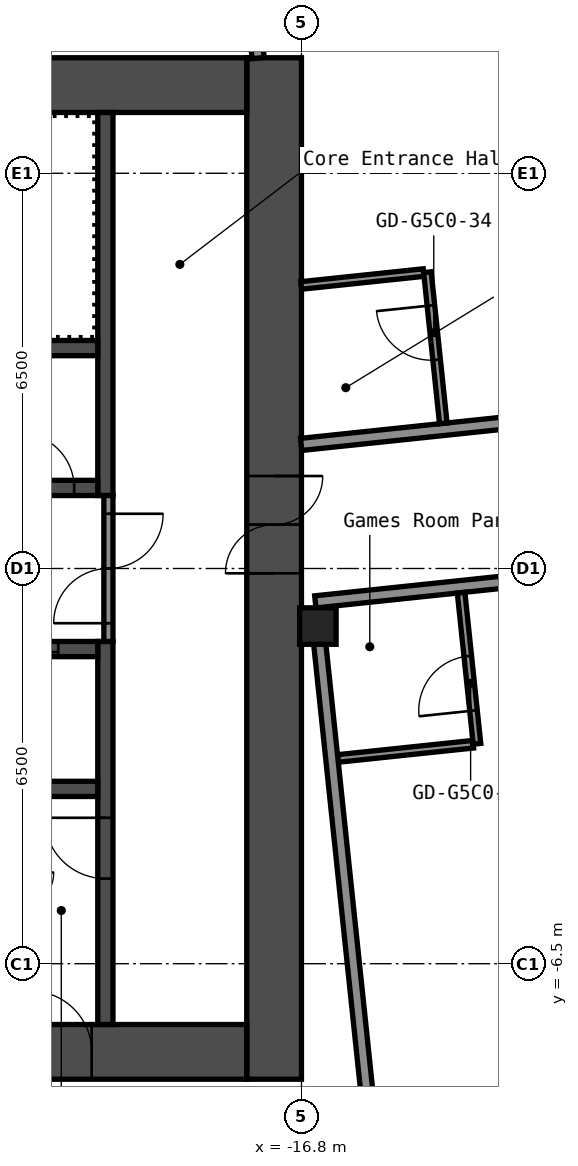
"""IFC4 building model, lengths in metres.
Left out: names, types, materials, properties, quantities, classifications, styles, units other than length and angle.
Written with IfcOpenShell. Run it as: python <this file> out.ifc"""

import sys

from ifc_helpers import new_model, si_unit, direction, frame, frame_2d, origin, origin_2d, place, context, subcontext, project, spatial, rectangle, hollow_rectangle, extrude, element, fill, save


model = new_model("IFC4")
c1 = context("Model", 3, precision=1e-05, world=origin(), true_north=direction((0.0, 1.0)))
c2 = subcontext(c1, "Body", "Model", "MODEL_VIEW")
j1 = project(units=[si_unit("LENGTHUNIT", "METRE"), si_unit("PLANEANGLEUNIT", "RADIAN")], contexts=[c1])
p1 = place(None, origin())
s1 = spatial("IfcSite", under=j1, at=p1, CompositionType="ELEMENT")
p2 = place(p1, origin())
s2 = spatial("IfcBuilding", under=s1, at=p2, CompositionType="ELEMENT")
p3 = place(p2, frame((0.0, 0.0, 245.4)))
s3 = spatial("IfcBuildingStorey", under=s2, at=p3, CompositionType="ELEMENT", Elevation=245.4)
p4 = place(p3, frame((-16.53, -0.947, 0.0), z_axis=(0.0, 0.0, 1.0), x_axis=(1.0, 0.0, 0.0)))
e1 = element("IfcColumn", 1, at=p4, inside=s3, PredefinedType="COLUMN", context=c2, shape_type="SweptSolid", body=[
    extrude(hollow_rectangle(XDim=0.6, YDim=0.6, WallThickness=0.025, InnerFilletRadius=0.038, OuterFilletRadius=0.062, at=origin_2d()), origin(), (0.0, 0.0, 1.0), 2.75),
])
p5 = place(p3, frame((-17.25, -8.4, 0.0), z_axis=(0.0, 0.0, 1.0), x_axis=(0.0, 1.0, 0.0)))
e2 = element("IfcWall", 2, at=p5, inside=s3, PredefinedType="SHEAR", context=c2, shape_type="SweptSolid", body=[
    extrude(rectangle(XDim=16.8, YDim=0.9, at=frame_2d((8.4, 0.0))), origin(), (0.0, 0.0, 1.0), 2.75),
])
p6 = place(p5, frame((8.321, 0.0, 0.0)))
e3 = element("IfcOpeningElement", 3, at=p6, cuts=e2, PredefinedType="OPENING", context=c2, shape_type="SweptSolid", body=[
    extrude(rectangle(XDim=1.6, YDim=2.1, at=frame_2d((0.8, 1.05))), frame((0.0, 0.46, 0.0), z_axis=(0.0, -1.0, 0.0), x_axis=(1.0, 0.0, 0.0)), (0.0, 0.0, 1.0), 0.92),
])
p7 = place(p3, frame((-32.7, 7.95, 0.0), z_axis=(0.0, 0.0, 1.0), x_axis=(1.0, 0.0, 0.0)))
e4 = element("IfcWall", 4, at=p7, inside=s3, PredefinedType="SHEAR", context=c2, shape_type="SweptSolid", body=[
    extrude(rectangle(XDim=15.0, YDim=0.9, at=frame_2d((7.5, 0.0))), origin(), (0.0, 0.0, 1.0), 2.75),
])
p8 = place(p7, frame((3.4, 0.0, 0.0)))
e5 = element("IfcOpeningElement", 5, at=p8, cuts=e4, PredefinedType="OPENING", context=c2, shape_type="SweptSolid", body=[
    extrude(rectangle(XDim=1.2, YDim=2.1, at=frame_2d((0.6, 1.05))), frame((0.0, 0.46, 0.0), z_axis=(0.0, -1.0, 0.0), x_axis=(1.0, 0.0, 0.0)), (0.0, 0.0, 1.0), 0.92),
])
p9 = place(p7, frame((0.75, 0.0, 0.0)))
e6 = element("IfcOpeningElement", 6, at=p9, cuts=e4, PredefinedType="OPENING", context=c2, shape_type="SweptSolid", body=[
    extrude(rectangle(XDim=0.9, YDim=2.1, at=frame_2d((0.45, 1.05))), frame((0.0, 0.46, 0.0), z_axis=(0.0, -1.0, 0.0), x_axis=(1.0, 0.0, 0.0)), (0.0, 0.0, 1.0), 0.92),
])
p10 = place(p3, frame((-32.7, -7.95, 0.0), z_axis=(0.0, 0.0, 1.0), x_axis=(1.0, 0.0, 0.0)))
e7 = element("IfcWall", 7, at=p10, inside=s3, PredefinedType="SHEAR", context=c2, shape_type="SweptSolid", body=[
    extrude(rectangle(XDim=15.0, YDim=0.9, at=frame_2d((7.5, 0.0))), origin(), (0.0, 0.0, 1.0), 2.75),
])
p11 = place(p10, frame((11.45, 0.0, 0.0)))
e8 = element("IfcOpeningElement", 8, at=p11, cuts=e7, PredefinedType="OPENING", context=c2, shape_type="SweptSolid", body=[
    extrude(rectangle(XDim=1.0, YDim=2.1, at=frame_2d((0.5, 1.05))), frame((0.0, 0.46, 0.0), z_axis=(0.0, -1.0, 0.0), x_axis=(1.0, 0.0, 0.0)), (0.0, 0.0, 1.0), 0.92),
])
p12 = place(p3, frame((-20.025, 1.2, 0.0), z_axis=(0.0, 0.0, 1.0), x_axis=(0.0, 1.0, 0.0)))
e9 = element("IfcWall", 9, at=p12, inside=s3, PredefinedType="SHEAR", context=c2, shape_type="SweptSolid", body=[
    extrude(rectangle(XDim=6.3, YDim=0.25, at=frame_2d((3.15, 0.0))), origin(), (0.0, 0.0, 1.0), 2.75),
])
p13 = place(p3, frame((-20.025, -7.5, 0.0), z_axis=(0.0, 0.0, 1.0), x_axis=(0.0, 1.0, 0.0)))
e10 = element("IfcWall", 10, at=p13, inside=s3, PredefinedType="SHEAR", context=c2, shape_type="SweptSolid", body=[
    extrude(rectangle(XDim=6.3, YDim=0.25, at=frame_2d((3.15, 0.0))), origin(), (0.0, 0.0, 1.0), 2.75),
])
p14 = place(p13, frame((2.4, 0.0, 0.0)))
e11 = element("IfcOpeningElement", 11, at=p14, cuts=e10, PredefinedType="OPENING", context=c2, shape_type="SweptSolid", body=[
    extrude(rectangle(XDim=1.0, YDim=2.1, at=frame_2d((0.5, 1.05))), frame((0.0, 0.135, 0.0), z_axis=(0.0, -1.0, 0.0), x_axis=(1.0, 0.0, 0.0)), (0.0, 0.0, 1.0), 0.27),
])
p15 = place(p3, frame((-27.65, 1.325, 0.0), z_axis=(0.0, 0.0, 1.0), x_axis=(1.0, 0.0, 0.0)))
e12 = element("IfcWall", 12, at=p15, inside=s3, PredefinedType="SHEAR", context=c2, shape_type="SweptSolid", body=[
    extrude(rectangle(XDim=7.5, YDim=0.25, at=frame_2d((3.75, 0.0))), origin(), (0.0, 0.0, 1.0), 2.75),
])
p16 = place(p15, frame((6.212, 0.0, 0.0)))
e13 = element("IfcOpeningElement", 13, at=p16, cuts=e12, PredefinedType="OPENING", context=c2, shape_type="SweptSolid", body=[
    extrude(rectangle(XDim=0.9, YDim=2.1, at=frame_2d((0.45, 1.05))), frame((0.0, 0.135, 0.0), z_axis=(0.0, -1.0, 0.0), x_axis=(1.0, 0.0, 0.0)), (0.0, 0.0, 1.0), 0.27),
])
p17 = place(p15, frame((2.512, 0.0, 0.0)))
e14 = element("IfcOpeningElement", 14, at=p17, cuts=e12, PredefinedType="OPENING", context=c2, shape_type="SweptSolid", body=[
    extrude(rectangle(XDim=0.9, YDim=2.1, at=frame_2d((0.45, 1.05))), frame((0.0, 0.135, 0.0), z_axis=(0.0, -1.0, 0.0), x_axis=(1.0, 0.0, 0.0)), (0.0, 0.0, 1.0), 0.27),
])
p18 = place(p3, frame((-27.65, 3.625, 0.0), z_axis=(0.0, 0.0, 1.0), x_axis=(1.0, 0.0, 0.0)))
e15 = element("IfcWall", 15, at=p18, inside=s3, PredefinedType="SHEAR", context=c2, shape_type="SweptSolid", body=[
    extrude(rectangle(XDim=7.5, YDim=0.25, at=frame_2d((3.75, 0.0))), origin(), (0.0, 0.0, 1.0), 2.75),
])
p19 = place(p3, frame((-27.65, -1.325, 0.0), z_axis=(0.0, 0.0, 1.0), x_axis=(1.0, 0.0, 0.0)))
e16 = element("IfcWall", 16, at=p19, inside=s3, PredefinedType="SHEAR", context=c2, shape_type="SweptSolid", body=[
    extrude(rectangle(XDim=7.5, YDim=0.25, at=frame_2d((3.75, 0.0))), origin(), (0.0, 0.0, 1.0), 2.75),
])
p20 = place(p19, frame((5.75, 0.0, 0.0)))
e17 = element("IfcOpeningElement", 17, at=p20, cuts=e16, PredefinedType="OPENING", context=c2, shape_type="SweptSolid", body=[
    extrude(rectangle(XDim=1.1, YDim=2.1, at=frame_2d((0.55, 1.05))), frame((0.0, 0.135, 0.0), z_axis=(0.0, -1.0, 0.0), x_axis=(1.0, 0.0, 0.0)), (0.0, 0.0, 1.0), 0.27),
])
p21 = place(p19, frame((3.35, 0.0, 0.0)))
e18 = element("IfcOpeningElement", 18, at=p21, cuts=e16, PredefinedType="OPENING", context=c2, shape_type="SweptSolid", body=[
    extrude(rectangle(XDim=1.1, YDim=2.1, at=frame_2d((0.55, 1.05))), frame((0.0, 0.135, 0.0), z_axis=(0.0, -1.0, 0.0), x_axis=(1.0, 0.0, 0.0)), (0.0, 0.0, 1.0), 0.27),
])
p22 = place(p19, frame((0.95, 0.0, 0.0)))
e19 = element("IfcOpeningElement", 19, at=p22, cuts=e16, PredefinedType="OPENING", context=c2, shape_type="SweptSolid", body=[
    extrude(rectangle(XDim=1.1, YDim=2.1, at=frame_2d((0.55, 1.05))), frame((0.0, 0.135, 0.0), z_axis=(0.0, -1.0, 0.0), x_axis=(1.0, 0.0, 0.0)), (0.0, 0.0, 1.0), 0.27),
])
p23 = place(p3, frame((-27.65, -3.625, 0.0), z_axis=(0.0, 0.0, 1.0), x_axis=(1.0, 0.0, 0.0)))
e20 = element("IfcWall", 20, at=p23, inside=s3, PredefinedType="SHEAR", context=c2, shape_type="SweptSolid", body=[
    extrude(rectangle(XDim=7.5, YDim=0.25, at=frame_2d((3.75, 0.0))), origin(), (0.0, 0.0, 1.0), 2.75),
])
p24 = place(p3, frame((-19.975, -1.2, 0.0), z_axis=(0.0, 0.0, 1.0), x_axis=(0.0, 1.0, 0.0)))
e21 = element("IfcWall", 21, at=p24, inside=s3, PredefinedType="PARTITIONING", context=c2, shape_type="SweptSolid", body=[
    extrude(rectangle(XDim=2.4, YDim=0.15, at=frame_2d((1.2, 0.0))), origin(), (0.0, 0.0, 1.0), 2.75),
])
p25 = place(p24, frame((0.3, 0.0, 0.0)))
e22 = element("IfcOpeningElement", 22, at=p25, cuts=e21, PredefinedType="OPENING", context=c2, shape_type="SweptSolid", body=[
    extrude(rectangle(XDim=1.8, YDim=2.1, at=frame_2d((0.9, 1.05))), frame((0.0, 0.085, 0.0), z_axis=(0.0, -1.0, 0.0), x_axis=(1.0, 0.0, 0.0)), (0.0, 0.0, 1.0), 0.17),
])
p26 = place(p3, frame((-16.201, -3.124, 0.0), z_axis=(0.0, 0.0, 1.0), x_axis=(0.99452218011, 0.104525754092, 0.0)))
e23 = element("IfcWall", 23, at=p26, inside=s3, PredefinedType="PARTITIONING", context=c2, shape_type="SweptSolid", body=[
    extrude(rectangle(XDim=2.238, YDim=0.125, at=frame_2d((1.119, 0.0))), origin(), (0.0, 0.0, 1.0), 2.75),
])
p27 = place(p3, frame((-16.572, -0.549, 0.0), z_axis=(0.0, 0.0, 1.0), x_axis=(0.994521146831, 0.104535584879, 0.0)))
e24 = element("IfcWall", 24, at=p27, inside=s3, PredefinedType="PARTITIONING", context=c2, shape_type="SweptSolid", body=[
    extrude(rectangle(XDim=33.561, YDim=0.2, at=frame_2d((16.78, 0.0))), origin(), (0.0, 0.0, 1.0), 2.75),
])
p28 = place(p27, frame((4.2, 0.0, 0.0)))
e25 = element("IfcOpeningElement", 25, at=p28, cuts=e24, PredefinedType="OPENING", context=c2, shape_type="SweptSolid", body=[
    extrude(rectangle(XDim=1.6, YDim=2.1, at=frame_2d((0.8, 1.05))), frame((0.0, 0.11, 0.0), z_axis=(0.0, -1.0, 0.0), x_axis=(1.0, 0.0, 0.0)), (0.0, 0.0, 1.0), 0.22),
])
p29 = place(p27, frame((11.25, 0.0, 0.0)))
e26 = element("IfcOpeningElement", 26, at=p29, cuts=e24, PredefinedType="OPENING", context=c2, shape_type="SweptSolid", body=[
    extrude(rectangle(XDim=1.0, YDim=2.1, at=frame_2d((0.5, 1.05))), frame((0.0, 0.11, 0.0), z_axis=(0.0, -1.0, 0.0), x_axis=(1.0, 0.0, 0.0)), (0.0, 0.0, 1.0), 0.22),
])
p30 = place(p27, frame((12.95, 0.0, 0.0)))
e27 = element("IfcOpeningElement", 27, at=p30, cuts=e24, PredefinedType="OPENING", context=c2, shape_type="SweptSolid", body=[
    extrude(rectangle(XDim=1.0, YDim=2.1, at=frame_2d((0.5, 1.05))), frame((0.0, 0.11, 0.0), z_axis=(0.0, -1.0, 0.0), x_axis=(1.0, 0.0, 0.0)), (0.0, 0.0, 1.0), 0.22),
])
p31 = place(p27, frame((18.2, 0.0, 0.0)))
e28 = element("IfcOpeningElement", 28, at=p31, cuts=e24, PredefinedType="OPENING", context=c2, shape_type="SweptSolid", body=[
    extrude(rectangle(XDim=0.9, YDim=2.1, at=frame_2d((0.45, 1.05))), frame((0.0, 0.11, 0.0), z_axis=(0.0, -1.0, 0.0), x_axis=(1.0, 0.0, 0.0)), (0.0, 0.0, 1.0), 0.22),
])
p32 = place(p27, frame((22.4, 0.0, 0.0)))
e29 = element("IfcOpeningElement", 29, at=p32, cuts=e24, PredefinedType="OPENING", context=c2, shape_type="SweptSolid", body=[
    extrude(rectangle(XDim=0.9, YDim=2.1, at=frame_2d((0.45, 1.05))), frame((0.0, 0.11, 0.0), z_axis=(0.0, -1.0, 0.0), x_axis=(1.0, 0.0, 0.0)), (0.0, 0.0, 1.0), 0.22),
])
p33 = place(p27, frame((26.345, 0.0, 0.0)))
e30 = element("IfcOpeningElement", 30, at=p33, cuts=e24, PredefinedType="OPENING", context=c2, shape_type="SweptSolid", body=[
    extrude(rectangle(XDim=0.9, YDim=2.1, at=frame_2d((0.45, 1.05))), frame((0.0, 0.11, 0.0), z_axis=(0.0, -1.0, 0.0), x_axis=(1.0, 0.0, 0.0)), (0.0, 0.0, 1.0), 0.22),
])
p34 = place(p27, frame((30.545, 0.0, 0.0)))
e31 = element("IfcOpeningElement", 31, at=p34, cuts=e24, PredefinedType="OPENING", context=c2, shape_type="SweptSolid", body=[
    extrude(rectangle(XDim=0.9, YDim=2.1, at=frame_2d((0.45, 1.05))), frame((0.0, 0.11, 0.0), z_axis=(0.0, -1.0, 0.0), x_axis=(1.0, 0.0, 0.0)), (0.0, 0.0, 1.0), 0.22),
])
p35 = place(p3, frame((-16.805, 2.041, 0.0), z_axis=(0.0, 0.0, 1.0), x_axis=(0.994521146831, 0.104535584879, 0.0)))
e32 = element("IfcWall", 32, at=p35, inside=s3, PredefinedType="PARTITIONING", context=c2, shape_type="SweptSolid", body=[
    extrude(rectangle(XDim=33.561, YDim=0.2, at=frame_2d((16.78, 0.0))), origin(), (0.0, 0.0, 1.0), 2.75),
])
p36 = place(p35, frame((4.161, 0.0, 0.0)))
e33 = element("IfcOpeningElement", 33, at=p36, cuts=e32, PredefinedType="OPENING", context=c2, shape_type="SweptSolid", body=[
    extrude(rectangle(XDim=1.6, YDim=2.1, at=frame_2d((0.8, 1.05))), frame((0.0, 0.11, 0.0), z_axis=(0.0, -1.0, 0.0), x_axis=(1.0, 0.0, 0.0)), (0.0, 0.0, 1.0), 0.22),
])
p37 = place(p35, frame((11.211, 0.0, 0.0)))
e34 = element("IfcOpeningElement", 34, at=p37, cuts=e32, PredefinedType="OPENING", context=c2, shape_type="SweptSolid", body=[
    extrude(rectangle(XDim=1.0, YDim=2.1, at=frame_2d((0.5, 1.05))), frame((0.0, 0.11, 0.0), z_axis=(0.0, -1.0, 0.0), x_axis=(1.0, 0.0, 0.0)), (0.0, 0.0, 1.0), 0.22),
])
p38 = place(p35, frame((12.911, 0.0, 0.0)))
e35 = element("IfcOpeningElement", 35, at=p38, cuts=e32, PredefinedType="OPENING", context=c2, shape_type="SweptSolid", body=[
    extrude(rectangle(XDim=1.0, YDim=2.1, at=frame_2d((0.5, 1.05))), frame((0.0, 0.11, 0.0), z_axis=(0.0, -1.0, 0.0), x_axis=(1.0, 0.0, 0.0)), (0.0, 0.0, 1.0), 0.22),
])
p39 = place(p35, frame((18.241, 0.0, 0.0)))
e36 = element("IfcOpeningElement", 36, at=p39, cuts=e32, PredefinedType="OPENING", context=c2, shape_type="SweptSolid", body=[
    extrude(rectangle(XDim=0.9, YDim=2.1, at=frame_2d((0.45, 1.05))), frame((0.0, 0.11, 0.0), z_axis=(0.0, -1.0, 0.0), x_axis=(1.0, 0.0, 0.0)), (0.0, 0.0, 1.0), 0.22),
])
p40 = place(p35, frame((22.441, 0.0, 0.0)))
e37 = element("IfcOpeningElement", 37, at=p40, cuts=e32, PredefinedType="OPENING", context=c2, shape_type="SweptSolid", body=[
    extrude(rectangle(XDim=0.9, YDim=2.1, at=frame_2d((0.45, 1.05))), frame((0.0, 0.11, 0.0), z_axis=(0.0, -1.0, 0.0), x_axis=(1.0, 0.0, 0.0)), (0.0, 0.0, 1.0), 0.22),
])
p41 = place(p35, frame((29.361, 0.0, 0.0)))
e38 = element("IfcOpeningElement", 38, at=p41, cuts=e32, PredefinedType="OPENING", context=c2, shape_type="SweptSolid", body=[
    extrude(rectangle(XDim=1.6, YDim=2.1, at=frame_2d((0.8, 1.05))), frame((0.0, 0.11, 0.0), z_axis=(0.0, -1.0, 0.0), x_axis=(1.0, 0.0, 0.0)), (0.0, 0.0, 1.0), 0.22),
])
p42 = place(p3, frame((-16.805, 4.655, 0.0), z_axis=(0.0, 0.0, 1.0), x_axis=(0.994521955988, 0.104527886512, 0.0)))
e39 = element("IfcWall", 39, at=p42, inside=s3, PredefinedType="PARTITIONING", context=c2, shape_type="SweptSolid", body=[
    extrude(rectangle(XDim=2.025, YDim=0.125, at=frame_2d((1.012, 0.0))), origin(), (0.0, 0.0, 1.0), 2.75),
])
p43 = place(p3, frame((-14.9, -16.461, 0.0), z_axis=(0.0, 0.0, 1.0), x_axis=(-0.104523729364, 0.99452239291, 0.0)))
e40 = element("IfcWall", 40, at=p43, inside=s3, PredefinedType="PARTITIONING", context=c2, shape_type="SweptSolid", body=[
    extrude(rectangle(XDim=15.308, YDim=0.2, at=frame_2d((7.654, 0.0))), origin(), (0.0, 0.0, 1.0), 2.75),
])
p44 = place(p3, frame((-17.512, 8.395, 0.0), z_axis=(0.0, 0.0, 1.0), x_axis=(-0.104524714473, 0.994522289375, 0.0)))
e41 = element("IfcWall", 41, at=p44, inside=s3, PredefinedType="PARTITIONING", context=c2, shape_type="SweptSolid", body=[
    extrude(rectangle(XDim=9.607, YDim=0.2, at=frame_2d((4.803, 0.0))), origin(), (0.0, 0.0, 1.0), 2.75),
])
p45 = place(p3, frame((-13.914, -2.884, 0.0), z_axis=(0.0, 0.0, 1.0), x_axis=(-0.104491611519, 0.994525767953, 0.0)))
e42 = element("IfcWall", 42, at=p45, inside=s3, PredefinedType="PARTITIONING", context=c2, shape_type="SweptSolid", body=[
    extrude(rectangle(XDim=2.5, YDim=0.125, at=frame_2d((1.25, 0.0))), origin(), (0.0, 0.0, 1.0), 2.75),
])
p46 = place(p45, frame((0.55, 0.0, 0.0)))
e43 = element("IfcOpeningElement", 43, at=p46, cuts=e42, PredefinedType="OPENING", context=c2, shape_type="SweptSolid", body=[
    extrude(rectangle(XDim=0.9, YDim=2.1, at=frame_2d((0.45, 1.05))), frame((0.0, 0.073, 0.0), z_axis=(0.0, -1.0, 0.0), x_axis=(1.0, 0.0, 0.0)), (0.0, 0.0, 1.0), 0.145),
])
p47 = place(p3, frame((-14.468, 2.387, 0.0), z_axis=(0.0, 0.0, 1.0), x_axis=(-0.104491611519, 0.994525767953, 0.0)))
e44 = element("IfcWall", 44, at=p47, inside=s3, PredefinedType="PARTITIONING", context=c2, shape_type="SweptSolid", body=[
    extrude(rectangle(XDim=2.5, YDim=0.125, at=frame_2d((1.25, 0.0))), origin(), (0.0, 0.0, 1.0), 2.75),
])
p48 = place(p47, frame((1.05, 0.0, 0.0)))
e45 = element("IfcOpeningElement", 45, at=p48, cuts=e44, PredefinedType="OPENING", context=c2, shape_type="SweptSolid", body=[
    extrude(rectangle(XDim=0.9, YDim=2.1, at=frame_2d((0.45, 1.05))), frame((0.0, 0.073, 0.0), z_axis=(0.0, -1.0, 0.0), x_axis=(1.0, 0.0, 0.0)), (0.0, 0.0, 1.0), 0.145),
])
p49 = place(p6, origin())
e46 = element("IfcDoor", 46, at=p49, inside=s3, OperationType="DOUBLE_DOOR_SINGLE_SWING", PredefinedType="DOOR", context=c2, shape_type="SweptSolid", body=[
    extrude(rectangle(XDim=1.6, YDim=2.1, at=frame_2d((0.8, 1.05))), frame((0.0, 0.025, 0.0), z_axis=(0.0, -1.0, 0.0), x_axis=(1.0, 0.0, 0.0)), (0.0, 0.0, 1.0), 0.05),
])
fill(e3, e46)
p50 = place(p11, origin())
e47 = element("IfcDoor", 47, at=p50, inside=s3, OperationType="SINGLE_SWING_RIGHT", PredefinedType="DOOR", context=c2, shape_type="SweptSolid", body=[
    extrude(rectangle(XDim=1.0, YDim=2.1, at=frame_2d((0.5, 1.05))), frame((0.0, 0.025, 0.0), z_axis=(0.0, -1.0, 0.0), x_axis=(1.0, 0.0, 0.0)), (0.0, 0.0, 1.0), 0.05),
])
fill(e8, e47)
p51 = place(p14, origin())
e48 = element("IfcDoor", 48, at=p51, inside=s3, OperationType="SINGLE_SWING_LEFT", PredefinedType="DOOR", context=c2, shape_type="SweptSolid", body=[
    extrude(rectangle(XDim=1.0, YDim=2.1, at=frame_2d((0.5, 1.05))), frame((0.0, 0.025, 0.0), z_axis=(0.0, -1.0, 0.0), x_axis=(1.0, 0.0, 0.0)), (0.0, 0.0, 1.0), 0.05),
])
fill(e11, e48)
p52 = place(p25, origin())
e49 = element("IfcDoor", 49, at=p52, inside=s3, OperationType="DOUBLE_DOOR_SINGLE_SWING", PredefinedType="DOOR", context=c2, shape_type="SweptSolid", body=[
    extrude(rectangle(XDim=1.8, YDim=2.1, at=frame_2d((0.9, 1.05))), frame((0.0, 0.025, 0.0), z_axis=(0.0, -1.0, 0.0), x_axis=(1.0, 0.0, 0.0)), (0.0, 0.0, 1.0), 0.05),
])
fill(e22, e49)
p53 = place(p16, origin())
e50 = element("IfcDoor", 50, at=p53, inside=s3, OperationType="SINGLE_SWING_RIGHT", PredefinedType="DOOR", context=c2, shape_type="SweptSolid", body=[
    extrude(rectangle(XDim=0.9, YDim=2.1, at=frame_2d((0.45, 1.05))), frame((0.0, 0.025, 0.0), z_axis=(0.0, -1.0, 0.0), x_axis=(1.0, 0.0, 0.0)), (0.0, 0.0, 1.0), 0.05),
])
fill(e13, e50)
p54 = place(p20, origin())
e51 = element("IfcDoor", 51, at=p54, inside=s3, OperationType="DOUBLE_DOOR_SLIDING", PredefinedType="DOOR", context=c2, shape_type="SweptSolid", body=[
    extrude(rectangle(XDim=1.1, YDim=2.1, at=frame_2d((0.55, 1.05))), frame((0.0, 0.025, 0.0), z_axis=(0.0, -1.0, 0.0), x_axis=(1.0, 0.0, 0.0)), (0.0, 0.0, 1.0), 0.05),
])
fill(e17, e51)
p55 = place(p46, origin())
e52 = element("IfcDoor", 52, at=p55, inside=s3, OperationType="SINGLE_SWING_RIGHT", PredefinedType="DOOR", context=c2, shape_type="SweptSolid", body=[
    extrude(rectangle(XDim=0.9, YDim=2.1, at=frame_2d((0.45, 1.05))), frame((0.0, 0.025, 0.0), z_axis=(0.0, -1.0, 0.0), x_axis=(1.0, 0.0, 0.0)), (0.0, 0.0, 1.0), 0.05),
])
fill(e43, e52)
p56 = place(p48, origin())
e53 = element("IfcDoor", 53, at=p56, inside=s3, OperationType="SINGLE_SWING_LEFT", PredefinedType="DOOR", context=c2, shape_type="SweptSolid", body=[
    extrude(rectangle(XDim=0.9, YDim=2.1, at=frame_2d((0.45, 1.05))), frame((0.0, 0.025, 0.0), z_axis=(0.0, -1.0, 0.0), x_axis=(1.0, 0.0, 0.0)), (0.0, 0.0, 1.0), 0.05),
])
fill(e45, e53)
save(model, sys.argv[1])
